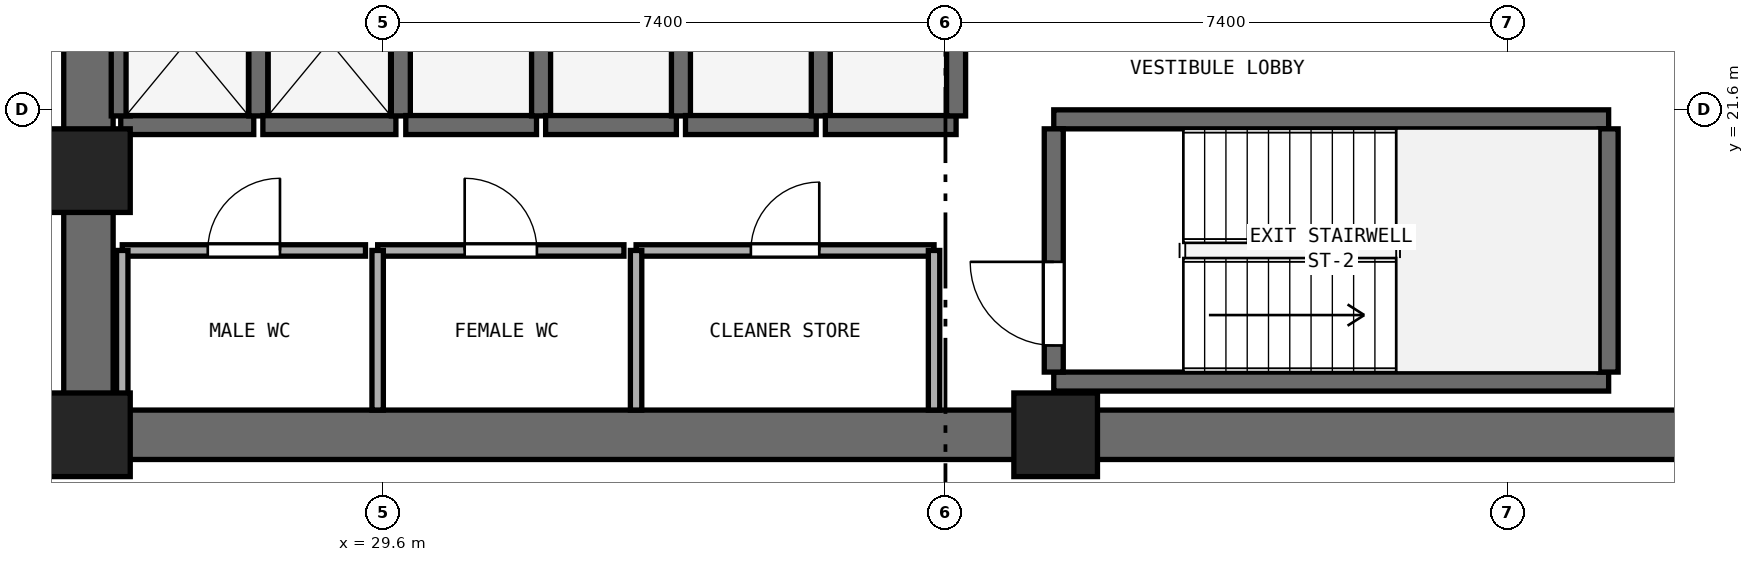
"""IFC4 building model, lengths in metres.
Left out: names, types, materials, properties, quantities, classifications, styles, units other than length and angle.
Written with IfcOpenShell. Run it as: python <this file> out.ifc"""

import sys

from ifc_helpers import new_model, si_unit, direction, frame, frame_2d, origin, origin_2d, place, context, subcontext, project, spatial, rectangle, extrude, element, fill, save


model = new_model("IFC4")
c1 = context("Model", 3, precision=1e-05, world=origin(), true_north=direction((0.0, 1.0)))
c2 = subcontext(c1, "Body", "Model", "MODEL_VIEW")
j1 = project(units=[si_unit("LENGTHUNIT", "METRE"), si_unit("PLANEANGLEUNIT", "RADIAN")], contexts=[c1])
p1 = place(None, origin())
s1 = spatial("IfcSite", under=j1, at=p1, CompositionType="ELEMENT")
p2 = place(p1, origin())
s2 = spatial("IfcBuilding", under=s1, at=p2, CompositionType="ELEMENT")
p3 = place(p2, frame((0.0, 0.0, 51.6)))
s3 = spatial("IfcBuildingStorey", under=s2, at=p3, CompositionType="ELEMENT", Elevation=51.6)
p4 = place(p3, frame((25.4, 17.325, 0.0), z_axis=(0.0, 0.0, 1.0), x_axis=(1.0, 0.0, 0.0)))
e1 = element("IfcWall", 1, at=p4, inside=s3, PredefinedType="SHEAR", context=c2, shape_type="SweptSolid", body=[
    extrude(rectangle(XDim=23.2, YDim=0.65, at=frame_2d((11.6, 0.0))), origin(), (0.0, 0.0, 1.0), 3.525),
])
p5 = place(p3, frame((25.725, 17.65, 0.0), z_axis=(0.0, 0.0, 1.0), x_axis=(0.0, 1.0, 0.0)))
e2 = element("IfcWall", 2, at=p5, inside=s3, PredefinedType="SHEAR", context=c2, shape_type="SweptSolid", body=[
    extrude(rectangle(XDim=15.1, YDim=0.65, at=frame_2d((7.55, 0.0))), origin(), (0.0, 0.0, 1.0), 3.525),
])
p6 = place(p5, frame((6.8, 0.0, 0.0)))
e3 = element("IfcOpeningElement", 3, at=p6, cuts=e2, PredefinedType="OPENING", context=c2, shape_type="SweptSolid", body=[
    extrude(rectangle(XDim=1.5, YDim=2.15, at=frame_2d((0.75, 1.075))), frame((0.0, 0.335, 0.0), z_axis=(0.0, -1.0, 0.0), x_axis=(1.0, 0.0, 0.0)), (0.0, 0.0, 1.0), 0.67),
])
for number, where, z_axis, x_axis in (
    (4, (25.725, 17.325, 0.0), (0.0, 0.0, 1.0), (1.0, 0.0, 0.0)),
    (5, (38.45, 17.325, 0.0), (0.0, 0.0, 1.0), (1.0, 0.0, 0.0)),
    (6, (25.725, 20.8, 0.0), (0.0, 0.0, 1.0), (1.0, 0.0, 0.0)),
):
    element("IfcColumn", number, at=place(p3, frame(where, z_axis=z_axis, x_axis=x_axis)), inside=s3, PredefinedType="PILASTER", context=c2, shape_type="SweptSolid", body=[
        extrude(rectangle(XDim=1.1, YDim=1.1, at=origin_2d()), origin(), (0.0, 0.0, 1.0), 3.8),
    ])
for number, where, z_axis, x_axis in (
    (7, (38.425, 18.025, 0.0), (0.0, 0.0, 1.0), (1.0, 0.0, 0.0)),
    (8, (38.425, 21.475, 0.0), (0.0, 0.0, 1.0), (1.0, 0.0, 0.0)),
):
    element("IfcWall", number, at=place(p3, frame(where, z_axis=z_axis, x_axis=x_axis)), inside=s3, PredefinedType="SHEAR", context=c2, shape_type="SweptSolid", body=[
        extrude(rectangle(XDim=7.3, YDim=0.25, at=frame_2d((3.65, 0.0))), origin(), (0.0, 0.0, 1.0), 3.525),
    ])
p7 = place(p3, frame((38.425, 18.15, 0.0), z_axis=(0.0, 0.0, 1.0), x_axis=(0.0, 1.0, 0.0)))
e9 = element("IfcWall", 9, at=p7, inside=s3, PredefinedType="SHEAR", context=c2, shape_type="SweptSolid", body=[
    extrude(rectangle(XDim=3.2, YDim=0.25, at=frame_2d((1.6, 0.0))), origin(), (0.0, 0.0, 1.0), 3.525),
])
p8 = place(p7, frame((0.35, 0.0, 0.0)))
e10 = element("IfcOpeningElement", 10, at=p8, cuts=e9, PredefinedType="OPENING", context=c2, shape_type="SweptSolid", body=[
    extrude(rectangle(XDim=1.1, YDim=2.15, at=frame_2d((0.55, 1.075))), frame((0.0, 0.135, 0.0), z_axis=(0.0, -1.0, 0.0), x_axis=(1.0, 0.0, 0.0)), (0.0, 0.0, 1.0), 0.27),
])
p9 = place(p3, frame((45.725, 18.15, 0.0), z_axis=(0.0, 0.0, 1.0), x_axis=(0.0, 1.0, 0.0)))
e11 = element("IfcWall", 11, at=p9, inside=s3, PredefinedType="SHEAR", context=c2, shape_type="SweptSolid", body=[
    extrude(rectangle(XDim=3.2, YDim=0.25, at=frame_2d((1.6, 0.0))), origin(), (0.0, 0.0, 1.0), 3.525),
])
p10 = place(p3, frame((26.15, 21.4, 0.0), z_axis=(0.0, 0.0, 1.0), x_axis=(1.0, 0.0, 0.0)))
e12 = element("IfcWall", 12, at=p10, inside=s3, PredefinedType="SHEAR", context=c2, shape_type="SweptSolid", body=[
    extrude(rectangle(XDim=1.75, YDim=0.25, at=frame_2d((0.875, 0.0))), origin(), (0.0, 0.0, 1.0), 3.525),
])
for number, where, z_axis, x_axis in (
    (13, (26.15, 21.52, 0.0), (0.0, 0.0, 1.0), (0.0, 1.0, 0.0)),
    (14, (27.96, 21.52, 0.0), (0.0, 0.0, 1.0), (0.0, 1.0, 0.0)),
):
    element("IfcWall", number, at=place(p3, frame(where, z_axis=z_axis, x_axis=x_axis)), inside=s3, PredefinedType="SHEAR", context=c2, shape_type="SweptSolid", body=[
        extrude(rectangle(XDim=1.96, YDim=0.25, at=frame_2d((0.98, 0.0))), origin(), (0.0, 0.0, 1.0), 3.525),
    ])
p11 = place(p3, frame((28.02, 21.4, 0.0), z_axis=(0.0, 0.0, 1.0), x_axis=(1.0, 0.0, 0.0)))
e15 = element("IfcWall", 15, at=p11, inside=s3, PredefinedType="SHEAR", context=c2, shape_type="SweptSolid", body=[
    extrude(rectangle(XDim=1.75, YDim=0.25, at=frame_2d((0.875, 0.0))), origin(), (0.0, 0.0, 1.0), 3.525),
])
p12 = place(p3, frame((29.835, 21.52, 0.0), z_axis=(0.0, 0.0, 1.0), x_axis=(0.0, 1.0, 0.0)))
e16 = element("IfcWall", 16, at=p12, inside=s3, PredefinedType="SHEAR", context=c2, shape_type="SweptSolid", body=[
    extrude(rectangle(XDim=1.96, YDim=0.25, at=frame_2d((0.98, 0.0))), origin(), (0.0, 0.0, 1.0), 3.525),
])
p13 = place(p3, frame((29.9, 21.4, 0.0), z_axis=(0.0, 0.0, 1.0), x_axis=(1.0, 0.0, 0.0)))
e17 = element("IfcWall", 17, at=p13, inside=s3, PredefinedType="SHEAR", context=c2, shape_type="SweptSolid", body=[
    extrude(rectangle(XDim=1.72, YDim=0.25, at=frame_2d((0.86, 0.0))), origin(), (0.0, 0.0, 1.0), 3.525),
])
p14 = place(p3, frame((31.68, 21.52, 0.0), z_axis=(0.0, 0.0, 1.0), x_axis=(0.0, 1.0, 0.0)))
e18 = element("IfcWall", 18, at=p14, inside=s3, PredefinedType="SHEAR", context=c2, shape_type="SweptSolid", body=[
    extrude(rectangle(XDim=1.96, YDim=0.25, at=frame_2d((0.98, 0.0))), origin(), (0.0, 0.0, 1.0), 3.525),
])
p15 = place(p3, frame((31.74, 21.4, 0.0), z_axis=(0.0, 0.0, 1.0), x_axis=(1.0, 0.0, 0.0)))
e19 = element("IfcWall", 19, at=p15, inside=s3, PredefinedType="SHEAR", context=c2, shape_type="SweptSolid", body=[
    extrude(rectangle(XDim=1.72, YDim=0.25, at=frame_2d((0.86, 0.0))), origin(), (0.0, 0.0, 1.0), 3.525),
])
p16 = place(p3, frame((33.52, 21.52, 0.0), z_axis=(0.0, 0.0, 1.0), x_axis=(0.0, 1.0, 0.0)))
e20 = element("IfcWall", 20, at=p16, inside=s3, PredefinedType="SHEAR", context=c2, shape_type="SweptSolid", body=[
    extrude(rectangle(XDim=1.96, YDim=0.25, at=frame_2d((0.98, 0.0))), origin(), (0.0, 0.0, 1.0), 3.525),
])
p17 = place(p3, frame((33.58, 21.4, 0.0), z_axis=(0.0, 0.0, 1.0), x_axis=(1.0, 0.0, 0.0)))
e21 = element("IfcWall", 21, at=p17, inside=s3, PredefinedType="SHEAR", context=c2, shape_type="SweptSolid", body=[
    extrude(rectangle(XDim=1.72, YDim=0.25, at=frame_2d((0.86, 0.0))), origin(), (0.0, 0.0, 1.0), 3.525),
])
p18 = place(p3, frame((35.36, 21.52, 0.0), z_axis=(0.0, 0.0, 1.0), x_axis=(0.0, 1.0, 0.0)))
e22 = element("IfcWall", 22, at=p18, inside=s3, PredefinedType="SHEAR", context=c2, shape_type="SweptSolid", body=[
    extrude(rectangle(XDim=1.96, YDim=0.25, at=frame_2d((0.98, 0.0))), origin(), (0.0, 0.0, 1.0), 3.525),
])
p19 = place(p3, frame((35.42, 21.4, 0.0), z_axis=(0.0, 0.0, 1.0), x_axis=(1.0, 0.0, 0.0)))
e23 = element("IfcWall", 23, at=p19, inside=s3, PredefinedType="SHEAR", context=c2, shape_type="SweptSolid", body=[
    extrude(rectangle(XDim=1.72, YDim=0.25, at=frame_2d((0.86, 0.0))), origin(), (0.0, 0.0, 1.0), 3.525),
])
p20 = place(p3, frame((37.14, 21.52, 0.0), z_axis=(0.0, 0.0, 1.0), x_axis=(0.0, 1.0, 0.0)))
e24 = element("IfcWall", 24, at=p20, inside=s3, PredefinedType="SHEAR", context=c2, shape_type="SweptSolid", body=[
    extrude(rectangle(XDim=1.96, YDim=0.25, at=frame_2d((0.98, 0.0))), origin(), (0.0, 0.0, 1.0), 3.525),
])
p21 = place(p3, frame((26.17, 19.75, 0.0), z_axis=(0.0, 0.0, 1.0), x_axis=(1.0, 0.0, 0.0)))
e25 = element("IfcWall", 25, at=p21, inside=s3, PredefinedType="PARTITIONING", context=c2, shape_type="SweptSolid", body=[
    extrude(rectangle(XDim=3.2, YDim=0.15, at=frame_2d((1.6, 0.0))), origin(), (0.0, 0.0, 1.0), 3.525),
])
p22 = place(p21, frame((1.125, 0.0, 0.0)))
e26 = element("IfcOpeningElement", 26, at=p22, cuts=e25, PredefinedType="OPENING", context=c2, shape_type="SweptSolid", body=[
    extrude(rectangle(XDim=0.95, YDim=2.1, at=frame_2d((0.475, 1.05))), frame((0.0, 0.085, 0.0), z_axis=(0.0, -1.0, 0.0), x_axis=(1.0, 0.0, 0.0)), (0.0, 0.0, 1.0), 0.17),
])
p23 = place(p3, frame((26.17, 17.65, 0.0), z_axis=(0.0, 0.0, 1.0), x_axis=(0.0, 1.0, 0.0)))
e27 = element("IfcWall", 27, at=p23, inside=s3, PredefinedType="PARTITIONING", context=c2, shape_type="SweptSolid", body=[
    extrude(rectangle(XDim=2.1, YDim=0.15, at=frame_2d((1.05, 0.0))), origin(), (0.0, 0.0, 1.0), 3.525),
])
p24 = place(p3, frame((29.53, 19.75, 0.0), z_axis=(0.0, 0.0, 1.0), x_axis=(1.0, 0.0, 0.0)))
e28 = element("IfcWall", 28, at=p24, inside=s3, PredefinedType="PARTITIONING", context=c2, shape_type="SweptSolid", body=[
    extrude(rectangle(XDim=3.24, YDim=0.15, at=frame_2d((1.62, 0.0))), origin(), (0.0, 0.0, 1.0), 3.525),
])
p25 = place(p24, frame((1.145, 0.0, 0.0)))
e29 = element("IfcOpeningElement", 29, at=p25, cuts=e28, PredefinedType="OPENING", context=c2, shape_type="SweptSolid", body=[
    extrude(rectangle(XDim=0.95, YDim=2.1, at=frame_2d((0.475, 1.05))), frame((0.0, 0.085, 0.0), z_axis=(0.0, -1.0, 0.0), x_axis=(1.0, 0.0, 0.0)), (0.0, 0.0, 1.0), 0.17),
])
p26 = place(p3, frame((29.53, 17.65, 0.0), z_axis=(0.0, 0.0, 1.0), x_axis=(0.0, 1.0, 0.0)))
e30 = element("IfcWall", 30, at=p26, inside=s3, PredefinedType="PARTITIONING", context=c2, shape_type="SweptSolid", body=[
    extrude(rectangle(XDim=2.1, YDim=0.15, at=frame_2d((1.05, 0.0))), origin(), (0.0, 0.0, 1.0), 3.525),
])
p27 = place(p3, frame((32.93, 19.75, 0.0), z_axis=(0.0, 0.0, 1.0), x_axis=(1.0, 0.0, 0.0)))
e31 = element("IfcWall", 31, at=p27, inside=s3, PredefinedType="PARTITIONING", context=c2, shape_type="SweptSolid", body=[
    extrude(rectangle(XDim=3.92, YDim=0.15, at=frame_2d((1.96, 0.0))), origin(), (0.0, 0.0, 1.0), 3.525),
])
p28 = place(p27, frame((1.51, 0.0, 0.0)))
e32 = element("IfcOpeningElement", 32, at=p28, cuts=e31, PredefinedType="OPENING", context=c2, shape_type="SweptSolid", body=[
    extrude(rectangle(XDim=0.9, YDim=2.1, at=frame_2d((0.45, 1.05))), frame((0.0, 0.085, 0.0), z_axis=(0.0, -1.0, 0.0), x_axis=(1.0, 0.0, 0.0)), (0.0, 0.0, 1.0), 0.17),
])
for number, where, z_axis, x_axis in (
    (33, (32.93, 17.65, 0.0), (0.0, 0.0, 1.0), (0.0, 1.0, 0.0)),
    (34, (36.85, 17.65, 0.0), (0.0, 0.0, 1.0), (0.0, 1.0, 0.0)),
):
    element("IfcWall", number, at=place(p3, frame(where, z_axis=z_axis, x_axis=x_axis)), inside=s3, PredefinedType="PARTITIONING", context=c2, shape_type="SweptSolid", body=[
        extrude(rectangle(XDim=2.1, YDim=0.15, at=frame_2d((1.05, 0.0))), origin(), (0.0, 0.0, 1.0), 3.525),
    ])
p29 = place(p8, origin())
e35 = element("IfcDoor", 35, at=p29, inside=s3, OperationType="SINGLE_SWING_RIGHT", PredefinedType="DOOR", context=c2, shape_type="SweptSolid", body=[
    extrude(rectangle(XDim=1.1, YDim=2.15, at=frame_2d((0.55, 1.075))), frame((0.0, 0.025, 0.0), z_axis=(0.0, -1.0, 0.0), x_axis=(1.0, 0.0, 0.0)), (0.0, 0.0, 1.0), 0.05),
])
fill(e10, e35)
p30 = place(p22, origin())
e36 = element("IfcDoor", 36, at=p30, inside=s3, OperationType="SINGLE_SWING_RIGHT", PredefinedType="DOOR", context=c2, shape_type="SweptSolid", body=[
    extrude(rectangle(XDim=0.95, YDim=2.1, at=frame_2d((0.475, 1.05))), frame((0.0, 0.025, 0.0), z_axis=(0.0, -1.0, 0.0), x_axis=(1.0, 0.0, 0.0)), (0.0, 0.0, 1.0), 0.05),
])
fill(e26, e36)
p31 = place(p25, origin())
e37 = element("IfcDoor", 37, at=p31, inside=s3, OperationType="SINGLE_SWING_LEFT", PredefinedType="DOOR", context=c2, shape_type="SweptSolid", body=[
    extrude(rectangle(XDim=0.95, YDim=2.1, at=frame_2d((0.475, 1.05))), frame((0.0, 0.025, 0.0), z_axis=(0.0, -1.0, 0.0), x_axis=(1.0, 0.0, 0.0)), (0.0, 0.0, 1.0), 0.05),
])
fill(e29, e37)
p32 = place(p28, origin())
e38 = element("IfcDoor", 38, at=p32, inside=s3, OperationType="SINGLE_SWING_RIGHT", PredefinedType="DOOR", context=c2, shape_type="SweptSolid", body=[
    extrude(rectangle(XDim=0.9, YDim=2.1, at=frame_2d((0.45, 1.05))), frame((0.0, 0.025, 0.0), z_axis=(0.0, -1.0, 0.0), x_axis=(1.0, 0.0, 0.0)), (0.0, 0.0, 1.0), 0.05),
])
fill(e32, e38)
save(model, sys.argv[1])
